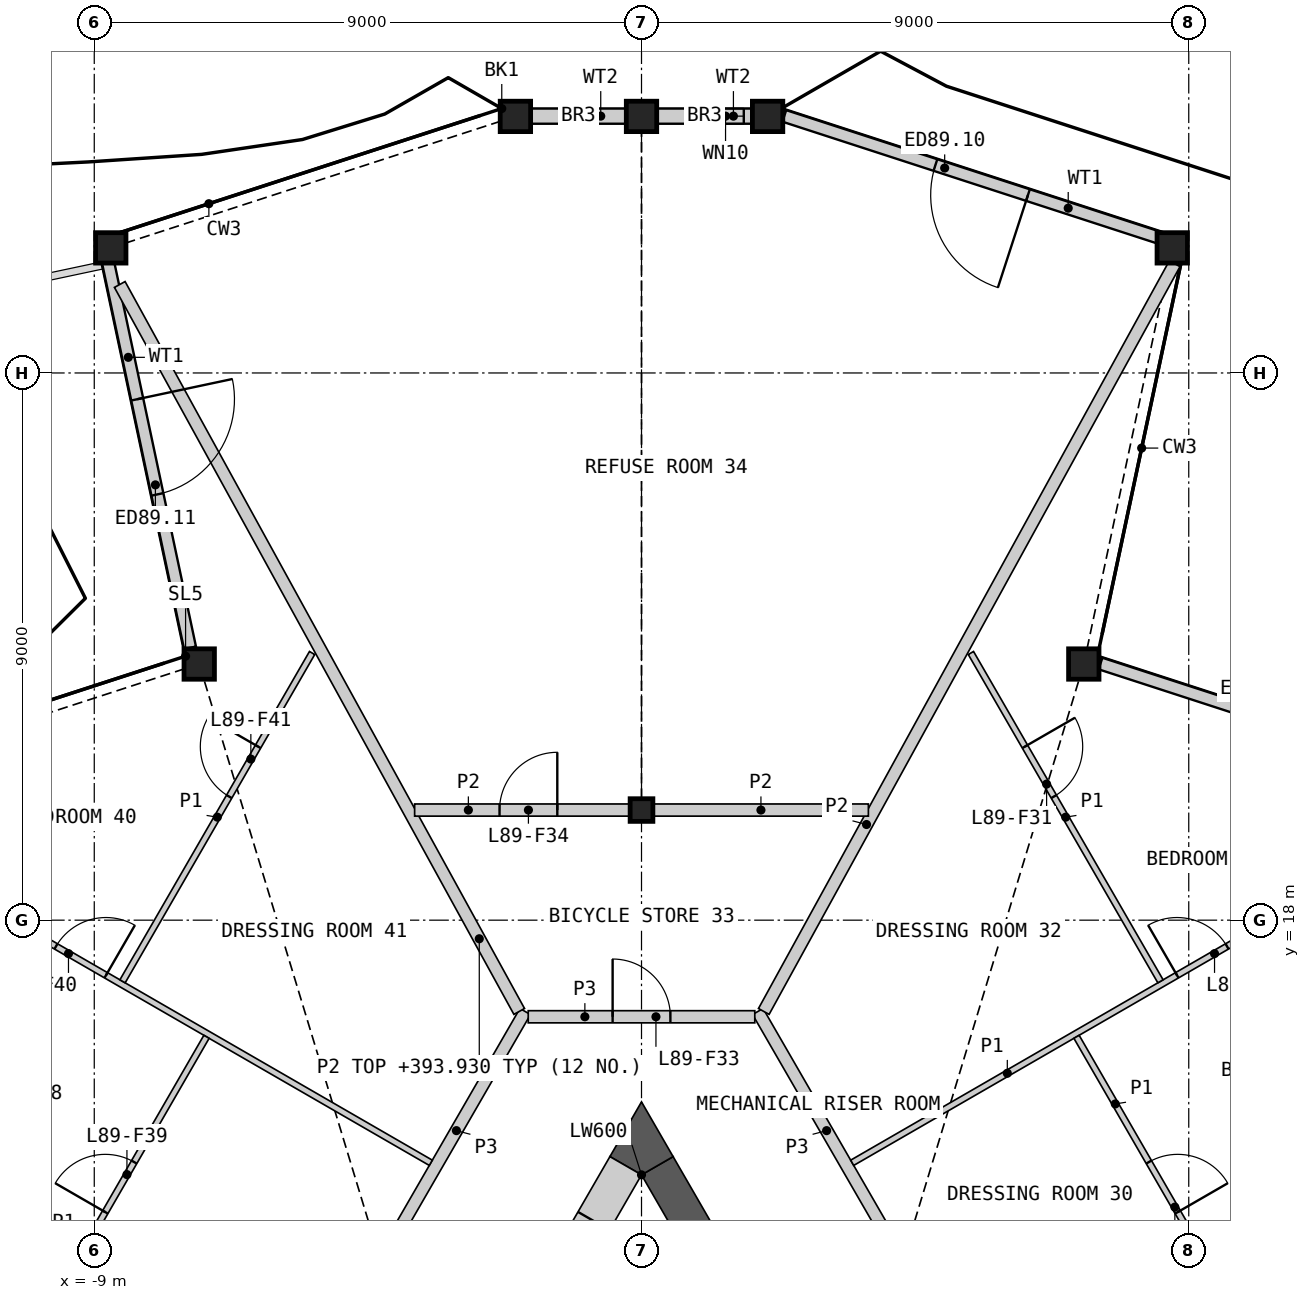
"""IFC4 building model, lengths in metres.
Left out: names, types, materials, properties, quantities, classifications, styles, units other than length and angle.
Written with IfcOpenShell. Run it as: python <this file> out.ifc"""

import sys

from ifc_helpers import new_model, si_unit, direction, frame, frame_2d, origin, origin_2d, place, context, subcontext, project, spatial, polyline, rectangle, hollow_rectangle, i_section, outline, extrude, element, fill, save


model = new_model("IFC4")
c1 = context("Model", 3, precision=1e-05, world=origin(), true_north=direction((0.0, 1.0)))
c2 = subcontext(c1, "Body", "Model", "MODEL_VIEW")
j1 = project(units=[si_unit("LENGTHUNIT", "METRE"), si_unit("PLANEANGLEUNIT", "RADIAN")], contexts=[c1])
p1 = place(None, origin())
s1 = spatial("IfcSite", under=j1, at=p1, CompositionType="ELEMENT")
p2 = place(p1, origin())
s2 = spatial("IfcBuilding", under=s1, at=p2, CompositionType="ELEMENT")
p3 = place(p2, frame((0.0, 0.0, 391.6)))
s3 = spatial("IfcBuildingStorey", under=s2, at=p3, CompositionType="ELEMENT", Elevation=391.6)
for number, where, z_axis, x_axis in (
    (1, (7.274, 22.213, 0.0), (0.0, 0.0, 1.0), (1.0, 0.0, 0.0)),
    (2, (8.729, 29.057, 0.0), (0.0, 0.0, 1.0), (1.0, 0.0, 0.0)),
    (3, (2.074, 31.219, 0.0), (0.0, 0.0, 1.0), (1.0, 0.0, 0.0)),
    (4, (0.0, 31.219, 0.0), (0.0, 0.0, 1.0), (1.0, 0.0, 0.0)),
    (5, (-2.074, 31.219, 0.0), (0.0, 0.0, 1.0), (1.0, 0.0, 0.0)),
    (6, (-8.729, 29.057, 0.0), (0.0, 0.0, 1.0), (1.0, 0.0, 0.0)),
    (7, (-7.274, 22.213, 0.0), (0.0, 0.0, 1.0), (1.0, 0.0, 0.0)),
):
    element("IfcColumn", number, at=place(p3, frame(where, z_axis=z_axis, x_axis=x_axis)), inside=s3, PredefinedType="COLUMN", context=c2, shape_type="SweptSolid", body=[
        extrude(hollow_rectangle(XDim=0.5, YDim=0.5, WallThickness=0.03, at=origin_2d()), origin(), (0.0, 0.0, 1.0), 3.4),
    ])
p4 = place(p3, frame((0.0, 19.811, 0.0), z_axis=(0.0, 0.0, 1.0), x_axis=(1.0, 0.0, 0.0)))
e8 = element("IfcColumn", 8, at=p4, inside=s3, PredefinedType="COLUMN", context=c2, shape_type="SweptSolid", body=[
    extrude(i_section(OverallWidth=0.374, OverallDepth=0.372, WebThickness=0.016, FlangeThickness=0.026, at=origin_2d()), origin(), (0.0, 0.0, 1.0), 3.4),
])
p5 = place(p3, frame((13.774, 20.198, 0.0), z_axis=(0.0, 0.0, 1.0), x_axis=(-0.951046950169, 0.309046434335, 0.0)))
e9 = element("IfcWall", 9, at=p5, inside=s3, PredefinedType="SOLIDWALL", context=c2, shape_type="SweptSolid", body=[
    extrude(rectangle(XDim=6.546, YDim=0.2, at=frame_2d((3.273, 0.0))), origin(), (0.0, 0.0, 1.0), 2.634),
])
p6 = place(p5, frame((2.333, 0.0, 0.0)))
e10 = element("IfcOpeningElement", 10, at=p6, cuts=e9, PredefinedType="OPENING", context=c2, shape_type="SweptSolid", body=[
    extrude(rectangle(XDim=1.6, YDim=2.25, at=frame_2d((0.8, 1.125))), frame((0.0, 0.11, 0.0), z_axis=(0.0, -1.0, 0.0), x_axis=(1.0, 0.0, 0.0)), (0.0, 0.0, 1.0), 0.22),
])
p7 = place(p3, frame((8.574, 29.205, 0.0), z_axis=(0.0, 0.0, 1.0), x_axis=(-0.951057912068, 0.309012698595, 0.0)))
e11 = element("IfcWall", 11, at=p7, inside=s3, PredefinedType="SOLIDWALL", context=c2, shape_type="SweptSolid", body=[
    extrude(rectangle(XDim=6.546, YDim=0.2, at=frame_2d((3.273, 0.0))), origin(), (0.0, 0.0, 1.0), 2.634),
])
p8 = place(p7, frame((2.333, 0.0, 0.0)))
e12 = element("IfcOpeningElement", 12, at=p8, cuts=e11, PredefinedType="OPENING", context=c2, shape_type="SweptSolid", body=[
    extrude(rectangle(XDim=1.6, YDim=2.25, at=frame_2d((0.8, 1.125))), frame((0.0, 0.11, 0.0), z_axis=(0.0, -1.0, 0.0), x_axis=(1.0, 0.0, 0.0)), (0.0, 0.0, 1.0), 0.22),
])
p9 = place(p3, frame((1.932, 31.224, 0.0), z_axis=(0.0, 0.0, 1.0), x_axis=(-1.0, 0.0, 0.0)))
e13 = element("IfcWall", 13, at=p9, inside=s3, PredefinedType="SOLIDWALL", context=c2, shape_type="SweptSolid", body=[
    extrude(rectangle(XDim=1.682, YDim=0.25, at=frame_2d((0.841, 0.0))), origin(), (0.0, 0.0, 1.0), 2.634),
])
p10 = place(p9, frame((0.25, 0.0, 0.4)))
e14 = element("IfcOpeningElement", 14, at=p10, cuts=e13, PredefinedType="OPENING", context=c2, shape_type="SweptSolid", body=[
    extrude(rectangle(XDim=0.6, YDim=0.6, at=frame_2d((0.3, 0.3))), frame((0.0, 0.135, 0.0), z_axis=(0.0, -1.0, 0.0), x_axis=(1.0, 0.0, 0.0)), (0.0, 0.0, 1.0), 0.27),
])
p11 = place(p3, frame((-0.25, 31.224, 0.0), z_axis=(0.0, 0.0, 1.0), x_axis=(-1.0, 0.0, 0.0)))
e15 = element("IfcWall", 15, at=p11, inside=s3, PredefinedType="SOLIDWALL", context=c2, shape_type="SweptSolid", body=[
    extrude(rectangle(XDim=1.682, YDim=0.25, at=frame_2d((0.841, 0.0))), origin(), (0.0, 0.0, 1.0), 2.634),
])
p12 = place(p3, frame((-8.779, 28.85, 0.0), z_axis=(0.0, 0.0, 1.0), x_axis=(0.207910765171, -0.978147797486, 0.0)))
e16 = element("IfcWall", 16, at=p12, inside=s3, PredefinedType="SOLIDWALL", context=c2, shape_type="SweptSolid", body=[
    extrude(rectangle(XDim=6.512, YDim=0.2, at=frame_2d((3.256, 0.0))), origin(), (0.0, 0.0, 1.0), 2.634),
])
p13 = place(p12, frame((2.333, 0.0, 0.0)))
e17 = element("IfcOpeningElement", 17, at=p13, cuts=e16, PredefinedType="OPENING", context=c2, shape_type="SweptSolid", body=[
    extrude(rectangle(XDim=1.6, YDim=2.25, at=frame_2d((0.8, 1.125))), frame((0.0, 0.11, 0.0), z_axis=(0.0, -1.0, 0.0), x_axis=(1.0, 0.0, 0.0)), (0.0, 0.0, 1.0), 0.22),
])
p14 = place(p3, frame((2.361, 10.322, 0.0), z_axis=(0.0, 0.0, 1.0), x_axis=(-0.500000735859, 0.866024978935, 0.0)))
e18 = element("IfcWall", 18, at=p14, inside=s3, PredefinedType="SHEAR", context=c2, shape_type="SweptSolid", body=[
    extrude(rectangle(XDim=4.202, YDim=0.6, at=frame_2d((2.101, 0.0))), origin(), (0.0, 0.0, 1.0), 3.1),
])
p15 = place(p3, origin())
e19 = element("IfcWall", 19, at=p15, inside=s3, PredefinedType="SHEAR", context=c2, shape_type="SweptSolid", body=[
    extrude(outline(polyline([(0.0, 13.811), (-0.52, 14.111), (0.0, 15.011), (0.52, 14.111), (0.0, 13.811)])), origin(), (0.0, 0.0, 1.0), 3.1),
])
p16 = place(p3, frame((-0.26, 13.961, 0.0), z_axis=(0.0, 0.0, 1.0), x_axis=(-0.49997936161, -0.866037319036, 0.0)))
e20 = element("IfcWall", 20, at=p16, inside=s3, PredefinedType="SHEAR", context=c2, shape_type="SweptSolid", body=[
    extrude(rectangle(XDim=2.66, YDim=0.6, at=frame_2d((1.33, 0.0))), origin(), (0.0, 0.0, 1.0), 3.1),
])
p17 = place(p16, frame((1.05, 0.0, 0.0)))
e21 = element("IfcOpeningElement", 21, at=p17, cuts=e20, PredefinedType="OPENING", context=c2, shape_type="SweptSolid", body=[
    extrude(rectangle(XDim=1.0, YDim=2.1, at=frame_2d((0.5, 1.05))), frame((0.0, 0.31, 0.0), z_axis=(0.0, -1.0, 0.0), x_axis=(1.0, 0.0, 0.0)), (0.0, 0.0, 1.0), 0.62),
])
for number, where, z_axis, x_axis in (
    (22, (-4.176, 12.579, 0.0), (0.0, 0.0, 1.0), (0.5, 0.866, 0.0)),
    (23, (1.913, 16.498, 0.0), (0.0, 0.0, 1.0), (0.5, -0.866, 0.0)),
):
    element("IfcWall", number, at=place(p3, frame(where, z_axis=z_axis, x_axis=x_axis)), inside=s3, PredefinedType="PARTITIONING", context=c2, shape_type="SweptSolid", body=[
        extrude(rectangle(XDim=4.525, YDim=0.2, at=frame_2d((2.263, 0.0))), origin(), (0.0, 0.0, 1.0), 3.1),
    ])
p18 = place(p3, frame((-1.863, 16.411, 0.0), z_axis=(0.0, 0.0, 1.0), x_axis=(1.0, 0.0, 0.0)))
e24 = element("IfcWall", 24, at=p18, inside=s3, PredefinedType="PARTITIONING", context=c2, shape_type="SweptSolid", body=[
    extrude(rectangle(XDim=3.726, YDim=0.2, at=frame_2d((1.863, 0.0))), origin(), (0.0, 0.0, 1.0), 3.1),
])
p19 = place(p18, frame((1.388, 0.0, 0.0)))
e25 = element("IfcOpeningElement", 25, at=p19, cuts=e24, PredefinedType="OPENING", context=c2, shape_type="SweptSolid", body=[
    extrude(rectangle(XDim=0.95, YDim=2.1, at=frame_2d((0.475, 1.05))), frame((0.0, 0.11, 0.0), z_axis=(0.0, -1.0, 0.0), x_axis=(1.0, 0.0, 0.0)), (0.0, 0.0, 1.0), 0.22),
])
p20 = place(p3, frame((-8.581, 28.455, 0.0), z_axis=(0.0, 0.0, 1.0), x_axis=(0.481551865547, -0.876417594979, 0.0)))
e26 = element("IfcWall", 26, at=p20, inside=s3, PredefinedType="PARTITIONING", context=c2, shape_type="SweptSolid", body=[
    extrude(rectangle(XDim=13.643, YDim=0.2, at=frame_2d((6.821, 0.0))), origin(), (0.0, 0.0, 1.0), 2.33),
])
p21 = place(p3, frame((2.011, 16.499, 0.0), z_axis=(0.0, 0.0, 1.0), x_axis=(0.481548701843, 0.876419333284, 0.0)))
e27 = element("IfcWall", 27, at=p21, inside=s3, PredefinedType="PARTITIONING", context=c2, shape_type="SweptSolid", body=[
    extrude(rectangle(XDim=14.032, YDim=0.2, at=frame_2d((7.016, 0.0))), origin(), (0.0, 0.0, 1.0), 2.33),
])
p22 = place(p3, frame((0.197, 19.811, 0.0), z_axis=(0.0, 0.0, 1.0), x_axis=(1.0, 0.0, 0.0)))
e28 = element("IfcWall", 28, at=p22, inside=s3, PredefinedType="PARTITIONING", context=c2, shape_type="SweptSolid", body=[
    extrude(rectangle(XDim=3.534, YDim=0.2, at=frame_2d((1.767, 0.0))), origin(), (0.0, 0.0, 1.0), 2.33),
])
p23 = place(p3, frame((-3.731, 19.811, 0.0), z_axis=(0.0, 0.0, 1.0), x_axis=(1.0, 0.0, 0.0)))
e29 = element("IfcWall", 29, at=p23, inside=s3, PredefinedType="PARTITIONING", context=c2, shape_type="SweptSolid", body=[
    extrude(rectangle(XDim=3.534, YDim=0.2, at=frame_2d((1.767, 0.0))), origin(), (0.0, 0.0, 1.0), 2.33),
])
p24 = place(p23, frame((1.396, 0.0, 0.0)))
e30 = element("IfcOpeningElement", 30, at=p24, cuts=e29, PredefinedType="OPENING", context=c2, shape_type="SweptSolid", body=[
    extrude(rectangle(XDim=0.95, YDim=2.1, at=frame_2d((0.475, 1.05))), frame((0.0, 0.11, 0.0), z_axis=(0.0, -1.0, 0.0), x_axis=(1.0, 0.0, 0.0)), (0.0, 0.0, 1.0), 0.22),
])
p25 = place(p3, frame((-13.669, 19.9, 0.0), z_axis=(0.0, 0.0, 1.0), x_axis=(0.866032376801, -0.499987922186, 0.0)))
e31 = element("IfcWall", 31, at=p25, inside=s3, PredefinedType="PARTITIONING", context=c2, shape_type="SweptSolid", body=[
    extrude(rectangle(XDim=11.782, YDim=0.1, at=frame_2d((5.891, 0.0))), origin(), (0.0, 0.0, 1.0), 2.33),
])
p26 = place(p25, frame((4.664, 0.0, 0.0)))
e32 = element("IfcOpeningElement", 32, at=p26, cuts=e31, PredefinedType="OPENING", context=c2, shape_type="SweptSolid", body=[
    extrude(rectangle(XDim=0.95, YDim=2.1, at=frame_2d((0.475, 1.05))), frame((0.0, 0.06, 0.0), z_axis=(0.0, -1.0, 0.0), x_axis=(1.0, 0.0, 0.0)), (0.0, 0.0, 1.0), 0.12),
])
p27 = place(p3, frame((3.465, 14.01, 0.0), z_axis=(0.0, 0.0, 1.0), x_axis=(0.866032376801, 0.499987922186, 0.0)))
e33 = element("IfcWall", 33, at=p27, inside=s3, PredefinedType="PARTITIONING", context=c2, shape_type="SweptSolid", body=[
    extrude(rectangle(XDim=11.782, YDim=0.1, at=frame_2d((5.891, 0.0))), origin(), (0.0, 0.0, 1.0), 2.33),
])
p28 = place(p27, frame((6.168, 0.0, 0.0)))
e34 = element("IfcOpeningElement", 34, at=p28, cuts=e33, PredefinedType="OPENING", context=c2, shape_type="SweptSolid", body=[
    extrude(rectangle(XDim=0.95, YDim=2.1, at=frame_2d((0.475, 1.05))), frame((0.0, 0.06, 0.0), z_axis=(0.0, -1.0, 0.0), x_axis=(1.0, 0.0, 0.0)), (0.0, 0.0, 1.0), 0.12),
])
p29 = place(p3, frame((6.065, 9.506, 0.0), z_axis=(0.0, 0.0, 1.0), x_axis=(0.866018949465, 0.500011179042, 0.0)))
e35 = element("IfcWall", 35, at=p29, inside=s3, PredefinedType="PARTITIONING", context=c2, shape_type="SweptSolid", body=[
    extrude(rectangle(XDim=7.1, YDim=0.1, at=frame_2d((3.55, 0.0))), origin(), (0.0, 0.0, 1.0), 2.33),
])
p30 = place(p29, frame((4.488, 0.0, 0.0)))
e36 = element("IfcOpeningElement", 36, at=p30, cuts=e35, PredefinedType="OPENING", context=c2, shape_type="SweptSolid", body=[
    extrude(rectangle(XDim=0.95, YDim=2.1, at=frame_2d((0.475, 1.05))), frame((0.0, 0.06, 0.0), z_axis=(0.0, -1.0, 0.0), x_axis=(1.0, 0.0, 0.0)), (0.0, 0.0, 1.0), 0.12),
])
p31 = place(p3, frame((-12.214, 13.056, 0.0), z_axis=(0.0, 0.0, 1.0), x_axis=(0.866018949465, -0.500011179042, 0.0)))
e37 = element("IfcWall", 37, at=p31, inside=s3, PredefinedType="PARTITIONING", context=c2, shape_type="SweptSolid", body=[
    extrude(rectangle(XDim=7.1, YDim=0.1, at=frame_2d((3.55, 0.0))), origin(), (0.0, 0.0, 1.0), 2.33),
])
p32 = place(p31, frame((1.663, 0.0, 0.0)))
e38 = element("IfcOpeningElement", 38, at=p32, cuts=e37, PredefinedType="OPENING", context=c2, shape_type="SweptSolid", body=[
    extrude(rectangle(XDim=0.95, YDim=2.1, at=frame_2d((0.475, 1.05))), frame((0.0, 0.06, 0.0), z_axis=(0.0, -1.0, 0.0), x_axis=(1.0, 0.0, 0.0)), (0.0, 0.0, 1.0), 0.12),
])
p33 = place(p3, frame((5.417, 22.394, 0.0), z_axis=(0.0, 0.0, 1.0), x_axis=(0.499975529996, -0.866039531087, 0.0)))
e39 = element("IfcWall", 39, at=p33, inside=s3, PredefinedType="PARTITIONING", context=c2, shape_type="SweptSolid", body=[
    extrude(rectangle(XDim=6.235, YDim=0.1, at=frame_2d((3.118, 0.0))), origin(), (0.0, 0.0, 1.0), 2.33),
])
p34 = place(p33, frame((1.777, 0.0, 0.0)))
e40 = element("IfcOpeningElement", 40, at=p34, cuts=e39, PredefinedType="OPENING", context=c2, shape_type="SweptSolid", body=[
    extrude(rectangle(XDim=0.95, YDim=2.1, at=frame_2d((0.475, 1.05))), frame((0.0, 0.06, 0.0), z_axis=(0.0, -1.0, 0.0), x_axis=(1.0, 0.0, 0.0)), (0.0, 0.0, 1.0), 0.12),
])
p35 = place(p3, frame((-8.535, 16.994, 0.0), z_axis=(0.0, 0.0, 1.0), x_axis=(0.499975529996, 0.866039531087, 0.0)))
e41 = element("IfcWall", 41, at=p35, inside=s3, PredefinedType="PARTITIONING", context=c2, shape_type="SweptSolid", body=[
    extrude(rectangle(XDim=6.235, YDim=0.1, at=frame_2d((3.118, 0.0))), origin(), (0.0, 0.0, 1.0), 2.33),
])
p36 = place(p35, frame((3.508, 0.0, 0.0)))
e42 = element("IfcOpeningElement", 42, at=p36, cuts=e41, PredefinedType="OPENING", context=c2, shape_type="SweptSolid", body=[
    extrude(rectangle(XDim=0.95, YDim=2.1, at=frame_2d((0.475, 1.05))), frame((0.0, 0.06, 0.0), z_axis=(0.0, -1.0, 0.0), x_axis=(1.0, 0.0, 0.0)), (0.0, 0.0, 1.0), 0.12),
])
p37 = place(p3, frame((7.154, 16.082, 0.0), z_axis=(0.0, 0.0, 1.0), x_axis=(0.499984882974, -0.866034131428, 0.0)))
e43 = element("IfcWall", 43, at=p37, inside=s3, PredefinedType="PARTITIONING", context=c2, shape_type="SweptSolid", body=[
    extrude(rectangle(XDim=5.1, YDim=0.1, at=frame_2d((2.55, 0.0))), origin(), (0.0, 0.0, 1.0), 2.33),
])
p38 = place(p37, frame((2.379, 0.0, 0.0)))
e44 = element("IfcOpeningElement", 44, at=p38, cuts=e43, PredefinedType="OPENING", context=c2, shape_type="SweptSolid", body=[
    extrude(rectangle(XDim=0.95, YDim=2.1, at=frame_2d((0.475, 1.05))), frame((0.0, 0.06, 0.0), z_axis=(0.0, -1.0, 0.0), x_axis=(1.0, 0.0, 0.0)), (0.0, 0.0, 1.0), 0.12),
])
p39 = place(p3, frame((-9.704, 11.665, 0.0), z_axis=(0.0, 0.0, 1.0), x_axis=(0.499984882974, 0.866034131428, 0.0)))
e45 = element("IfcWall", 45, at=p39, inside=s3, PredefinedType="PARTITIONING", context=c2, shape_type="SweptSolid", body=[
    extrude(rectangle(XDim=5.1, YDim=0.1, at=frame_2d((2.55, 0.0))), origin(), (0.0, 0.0, 1.0), 2.33),
])
p40 = place(p39, frame((1.771, 0.0, 0.0)))
e46 = element("IfcOpeningElement", 46, at=p40, cuts=e45, PredefinedType="OPENING", context=c2, shape_type="SweptSolid", body=[
    extrude(rectangle(XDim=0.95, YDim=2.1, at=frame_2d((0.475, 1.05))), frame((0.0, 0.06, 0.0), z_axis=(0.0, -1.0, 0.0), x_axis=(1.0, 0.0, 0.0)), (0.0, 0.0, 1.0), 0.12),
])
p41 = place(p8, origin())
e47 = element("IfcDoor", 47, at=p41, inside=s3, OperationType="DOUBLE_DOOR_SINGLE_SWING", PredefinedType="DOOR", context=c2, shape_type="SweptSolid", body=[
    extrude(rectangle(XDim=1.6, YDim=2.25, at=frame_2d((0.8, 1.125))), frame((0.0, 0.025, 0.0), z_axis=(0.0, -1.0, 0.0), x_axis=(1.0, 0.0, 0.0)), (0.0, 0.0, 1.0), 0.05),
])
fill(e12, e47)
p42 = place(p10, origin())
e48 = element("IfcWindow", 48, at=p42, inside=s3, PartitioningType="SINGLE_PANEL", PredefinedType="WINDOW", context=c2, shape_type="SweptSolid", body=[
    extrude(rectangle(XDim=0.6, YDim=0.6, at=frame_2d((0.3, 0.3))), frame((0.0, 0.03, 0.0), z_axis=(0.0, -1.0, 0.0), x_axis=(1.0, 0.0, 0.0)), (0.0, 0.0, 1.0), 0.06),
])
fill(e14, e48)
p43 = place(p13, origin())
e49 = element("IfcDoor", 49, at=p43, inside=s3, OperationType="DOUBLE_DOOR_SINGLE_SWING", PredefinedType="DOOR", context=c2, shape_type="SweptSolid", body=[
    extrude(rectangle(XDim=1.6, YDim=2.25, at=frame_2d((0.8, 1.125))), frame((0.0, 0.025, 0.0), z_axis=(0.0, -1.0, 0.0), x_axis=(1.0, 0.0, 0.0)), (0.0, 0.0, 1.0), 0.05),
])
fill(e17, e49)
p44 = place(p38, origin())
e50 = element("IfcDoor", 50, at=p44, inside=s3, OperationType="SINGLE_SWING_RIGHT", PredefinedType="DOOR", context=c2, shape_type="SweptSolid", body=[
    extrude(rectangle(XDim=0.95, YDim=2.1, at=frame_2d((0.475, 1.05))), frame((0.0, 0.025, 0.0), z_axis=(0.0, -1.0, 0.0), x_axis=(1.0, 0.0, 0.0)), (0.0, 0.0, 1.0), 0.05),
])
fill(e44, e50)
p45 = place(p28, origin())
e51 = element("IfcDoor", 51, at=p45, inside=s3, OperationType="SINGLE_SWING_LEFT", PredefinedType="DOOR", context=c2, shape_type="SweptSolid", body=[
    extrude(rectangle(XDim=0.95, YDim=2.1, at=frame_2d((0.475, 1.05))), frame((0.0, 0.025, 0.0), z_axis=(0.0, -1.0, 0.0), x_axis=(1.0, 0.0, 0.0)), (0.0, 0.0, 1.0), 0.05),
])
fill(e34, e51)
p46 = place(p34, origin())
e52 = element("IfcDoor", 52, at=p46, inside=s3, OperationType="SINGLE_SWING_LEFT", PredefinedType="DOOR", context=c2, shape_type="SweptSolid", body=[
    extrude(rectangle(XDim=0.95, YDim=2.1, at=frame_2d((0.475, 1.05))), frame((0.0, 0.025, 0.0), z_axis=(0.0, -1.0, 0.0), x_axis=(1.0, 0.0, 0.0)), (0.0, 0.0, 1.0), 0.05),
])
fill(e40, e52)
p47 = place(p19, origin())
e53 = element("IfcDoor", 53, at=p47, inside=s3, OperationType="SINGLE_SWING_LEFT", PredefinedType="DOOR", context=c2, shape_type="SweptSolid", body=[
    extrude(rectangle(XDim=0.95, YDim=2.1, at=frame_2d((0.475, 1.05))), frame((0.0, 0.025, 0.0), z_axis=(0.0, -1.0, 0.0), x_axis=(1.0, 0.0, 0.0)), (0.0, 0.0, 1.0), 0.05),
])
fill(e25, e53)
p48 = place(p24, origin())
e54 = element("IfcDoor", 54, at=p48, inside=s3, OperationType="SINGLE_SWING_RIGHT", PredefinedType="DOOR", context=c2, shape_type="SweptSolid", body=[
    extrude(rectangle(XDim=0.95, YDim=2.1, at=frame_2d((0.475, 1.05))), frame((0.0, 0.025, 0.0), z_axis=(0.0, -1.0, 0.0), x_axis=(1.0, 0.0, 0.0)), (0.0, 0.0, 1.0), 0.05),
])
fill(e30, e54)
p49 = place(p40, origin())
e55 = element("IfcDoor", 55, at=p49, inside=s3, OperationType="SINGLE_SWING_LEFT", PredefinedType="DOOR", context=c2, shape_type="SweptSolid", body=[
    extrude(rectangle(XDim=0.95, YDim=2.1, at=frame_2d((0.475, 1.05))), frame((0.0, 0.025, 0.0), z_axis=(0.0, -1.0, 0.0), x_axis=(1.0, 0.0, 0.0)), (0.0, 0.0, 1.0), 0.05),
])
fill(e46, e55)
p50 = place(p26, origin())
e56 = element("IfcDoor", 56, at=p50, inside=s3, OperationType="SINGLE_SWING_RIGHT", PredefinedType="DOOR", context=c2, shape_type="SweptSolid", body=[
    extrude(rectangle(XDim=0.95, YDim=2.1, at=frame_2d((0.475, 1.05))), frame((0.0, 0.025, 0.0), z_axis=(0.0, -1.0, 0.0), x_axis=(1.0, 0.0, 0.0)), (0.0, 0.0, 1.0), 0.05),
])
fill(e32, e56)
p51 = place(p36, origin())
e57 = element("IfcDoor", 57, at=p51, inside=s3, OperationType="SINGLE_SWING_RIGHT", PredefinedType="DOOR", context=c2, shape_type="SweptSolid", body=[
    extrude(rectangle(XDim=0.95, YDim=2.1, at=frame_2d((0.475, 1.05))), frame((0.0, 0.025, 0.0), z_axis=(0.0, -1.0, 0.0), x_axis=(1.0, 0.0, 0.0)), (0.0, 0.0, 1.0), 0.05),
])
fill(e42, e57)
save(model, sys.argv[1])
